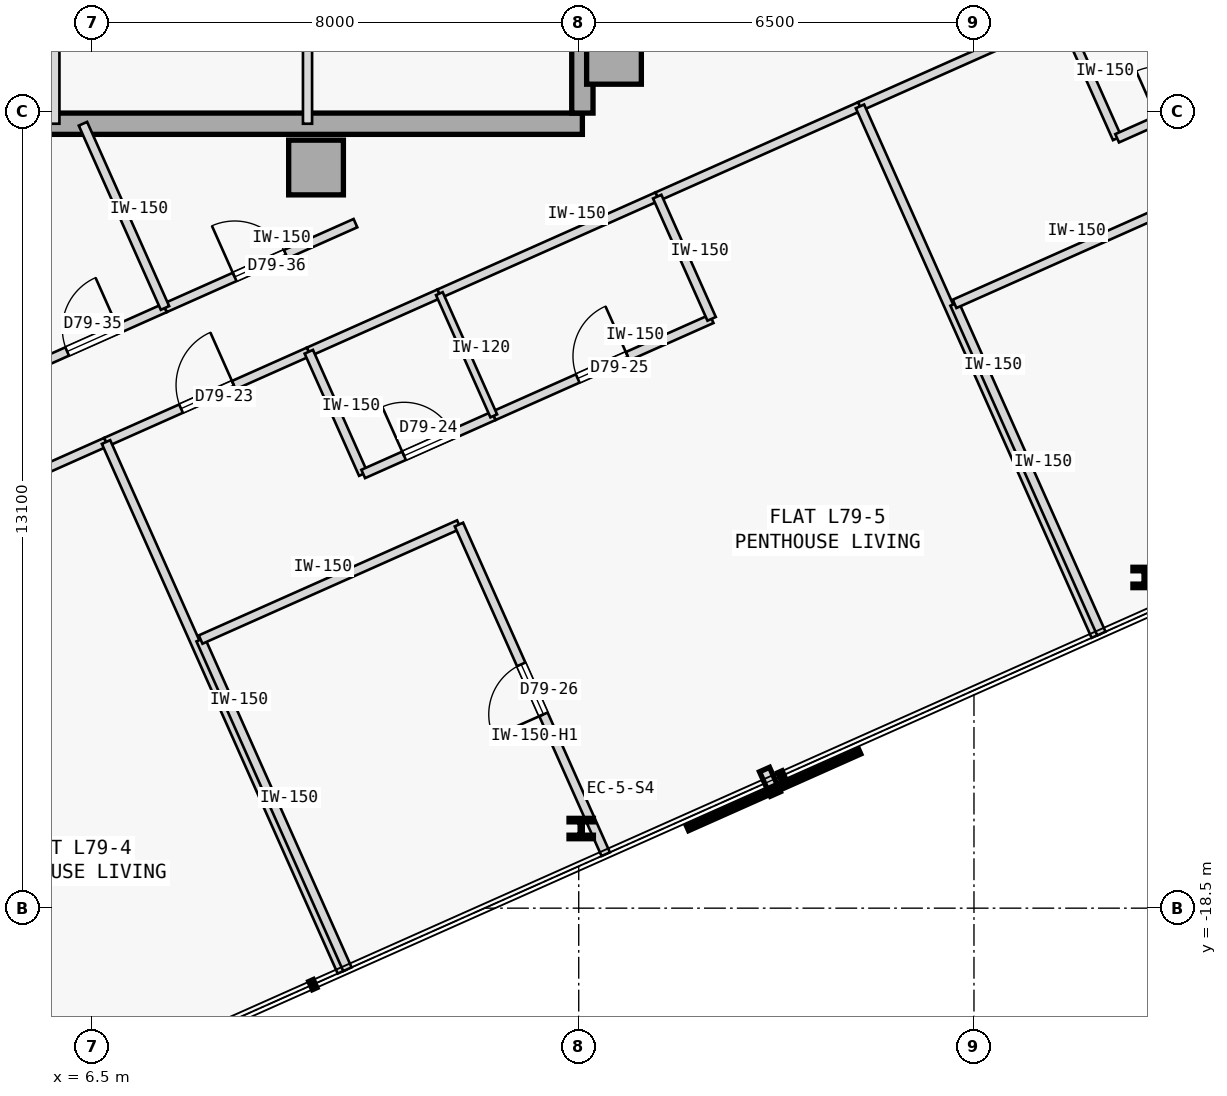
"""IFC4 building model, lengths in metres.
Left out: names, types, materials, properties, quantities, classifications, styles, units other than length and angle.
Written with IfcOpenShell. Run it as: python <this file> out.ifc"""

import sys

from ifc_helpers import new_model, si_unit, direction, frame, frame_2d, origin, origin_2d, place, context, subcontext, project, spatial, rectangle, i_section, extrude, element, fill, save


model = new_model("IFC4")
c1 = context("Model", 3, precision=1e-05, world=origin(), true_north=direction((0.0, 1.0)))
c2 = subcontext(c1, "Body", "Model", "MODEL_VIEW")
j1 = project(units=[si_unit("LENGTHUNIT", "METRE"), si_unit("PLANEANGLEUNIT", "RADIAN")], contexts=[c1])
p1 = place(None, origin())
s1 = spatial("IfcSite", under=j1, at=p1, CompositionType="ELEMENT")
p2 = place(p1, origin())
s2 = spatial("IfcBuilding", under=s1, at=p2, CompositionType="ELEMENT")
p3 = place(p2, frame((0.0, 0.0, 295.3)))
s3 = spatial("IfcBuildingStorey", under=s2, at=p3, CompositionType="ELEMENT", Elevation=295.3)
for number, where, z_axis, x_axis in (
    (1, (15.08, -4.5, 0.0), (0.0, 0.0, 1.0), (1.0, 0.0, 0.0)),
    (2, (10.18, -6.32, 0.0), (0.0, 0.0, 1.0), (1.0, 0.0, 0.0)),
):
    element("IfcColumn", number, at=place(p3, frame(where, z_axis=z_axis, x_axis=x_axis)), inside=s3, PredefinedType="COLUMN", context=c2, shape_type="SweptSolid", body=[
        extrude(rectangle(XDim=0.9, YDim=0.9, at=origin_2d()), origin(), (0.0, 0.0, 1.0), 3.35),
    ])
p4 = place(p3, frame((3.7, -5.6, 0.0), z_axis=(0.0, 0.0, 1.0), x_axis=(1.0, 0.0, 0.0)))
e3 = element("IfcWall", 3, at=p4, inside=s3, PredefinedType="SHEAR", context=c2, shape_type="SweptSolid", body=[
    extrude(rectangle(XDim=10.86, YDim=0.35, at=frame_2d((5.43, 0.0))), origin(), (0.0, 0.0, 1.0), 3.125),
])
p5 = place(p3, frame((14.56, -5.425, 0.0), z_axis=(0.0, 0.0, 1.0), x_axis=(0.0, 1.0, 0.0)))
e4 = element("IfcWall", 4, at=p5, inside=s3, PredefinedType="SHEAR", context=c2, shape_type="SweptSolid", body=[
    extrude(rectangle(XDim=10.85, YDim=0.35, at=frame_2d((5.425, 0.0))), origin(), (0.0, 0.0, 1.0), 3.125),
])
for number, where, z_axis, x_axis in (
    (5, (14.541, -17.19, 0.0), (0.0, 0.0, 1.0), (1.0, 0.0, 0.0)),
    (6, (23.814, -13.062, 0.0), (0.0, 0.0, 1.0), (1.0, 0.0, 0.0)),
):
    element("IfcColumn", number, at=place(p3, frame(where, z_axis=z_axis, x_axis=x_axis)), inside=s3, PredefinedType="COLUMN", context=c2, shape_type="SweptSolid", body=[
        extrude(i_section(OverallWidth=0.401, OverallDepth=0.335, WebThickness=0.036, FlangeThickness=0.058, FilletRadius=0.015, at=origin_2d()), origin(), (0.0, 0.0, 1.0), 3.35),
    ])
p6 = place(p3, frame((5.86, -5.6, 0.0), z_axis=(0.0, 0.0, 1.0), x_axis=(0.0, 1.0, 0.0)))
e7 = element("IfcWall", 7, at=p6, inside=s3, PredefinedType="STANDARD", context=c2, shape_type="SweptSolid", body=[
    extrude(rectangle(XDim=2.65, YDim=0.2, at=frame_2d((1.325, 0.0))), origin(), (0.0, 0.0, 1.0), 3.125),
])
p7 = place(p3, frame((10.04, -5.6, 0.0), z_axis=(0.0, 0.0, 1.0), x_axis=(0.0, 1.0, 0.0)))
e8 = element("IfcWall", 8, at=p7, inside=s3, PredefinedType="PARTITIONING", context=c2, shape_type="SweptSolid", body=[
    extrude(rectangle(XDim=2.65, YDim=0.15, at=frame_2d((1.325, 0.0))), origin(), (0.0, 0.0, 1.0), 3.125),
])
p8 = place(p3, frame((3.306, -12.357, 0.0), z_axis=(0.0, 0.0, 1.0), x_axis=(0.913550513402, 0.406725287464, 0.0)))
e9 = element("IfcWall", 9, at=p8, inside=s3, PredefinedType="PARTITIONING", context=c2, shape_type="SweptSolid", body=[
    extrude(rectangle(XDim=3.744, YDim=0.15, at=frame_2d((1.872, 0.0))), origin(), (0.0, 0.0, 1.0), 3.125),
])
p9 = place(p8, frame((1.397, 0.0, 0.0)))
e10 = element("IfcOpeningElement", 10, at=p9, cuts=e9, PredefinedType="OPENING", context=c2, shape_type="SweptSolid", body=[
    extrude(rectangle(XDim=0.95, YDim=2.15, at=frame_2d((0.475, 1.075))), frame((0.0, 0.085, 0.0), z_axis=(0.0, -1.0, 0.0), x_axis=(1.0, 0.0, 0.0)), (0.0, 0.0, 1.0), 0.17),
])
p10 = place(p3, frame((6.727, -10.834, 0.0), z_axis=(0.0, 0.0, 1.0), x_axis=(0.913543802, 0.40674036169, 0.0)))
e11 = element("IfcWall", 11, at=p10, inside=s3, PredefinedType="PARTITIONING", context=c2, shape_type="SweptSolid", body=[
    extrude(rectangle(XDim=3.65, YDim=0.15, at=frame_2d((1.825, 0.0))), origin(), (0.0, 0.0, 1.0), 3.125),
])
p11 = place(p10, frame((1.35, 0.0, 0.0)))
e12 = element("IfcOpeningElement", 12, at=p11, cuts=e11, PredefinedType="OPENING", context=c2, shape_type="SweptSolid", body=[
    extrude(rectangle(XDim=0.95, YDim=2.15, at=frame_2d((0.475, 1.075))), frame((0.0, 0.085, 0.0), z_axis=(0.0, -1.0, 0.0), x_axis=(1.0, 0.0, 0.0)), (0.0, 0.0, 1.0), 0.17),
])
p12 = place(p3, frame((15.791, -6.799, 0.0), z_axis=(0.0, 0.0, 1.0), x_axis=(0.913543802, 0.40674036169, 0.0)))
e13 = element("IfcWall", 13, at=p12, inside=s3, PredefinedType="PARTITIONING", context=c2, shape_type="SweptSolid", body=[
    extrude(rectangle(XDim=3.65, YDim=0.15, at=frame_2d((1.825, 0.0))), origin(), (0.0, 0.0, 1.0), 3.125),
])
p13 = place(p3, frame((10.061, -9.35, 0.0), z_axis=(0.0, 0.0, 1.0), x_axis=(0.913558622212, 0.406707073682, 0.0)))
e14 = element("IfcWall", 14, at=p13, inside=s3, PredefinedType="PARTITIONING", context=c2, shape_type="SweptSolid", body=[
    extrude(rectangle(XDim=2.35, YDim=0.15, at=frame_2d((1.175, 0.0))), origin(), (0.0, 0.0, 1.0), 3.125),
])
p14 = place(p3, frame((12.208, -8.394, 0.0), z_axis=(0.0, 0.0, 1.0), x_axis=(0.913539234326, 0.406750620585, 0.0)))
e15 = element("IfcWall", 15, at=p14, inside=s3, PredefinedType="PARTITIONING", context=c2, shape_type="SweptSolid", body=[
    extrude(rectangle(XDim=3.922, YDim=0.15, at=frame_2d((1.961, 0.0))), origin(), (0.0, 0.0, 1.0), 3.125),
])
p15 = place(p3, frame((19.125, -5.314, 0.0), z_axis=(0.0, 0.0, 1.0), x_axis=(0.913543802, 0.40674036169, 0.0)))
e16 = element("IfcWall", 16, at=p15, inside=s3, PredefinedType="PARTITIONING", context=c2, shape_type="SweptSolid", body=[
    extrude(rectangle(XDim=3.65, YDim=0.15, at=frame_2d((1.825, 0.0))), origin(), (0.0, 0.0, 1.0), 3.125),
])
p16 = place(p3, frame((5.32, -9.688, 0.0), z_axis=(0.0, 0.0, 1.0), x_axis=(0.913559784164, 0.406704463658, 0.0)))
e17 = element("IfcWall", 17, at=p16, inside=s3, PredefinedType="PARTITIONING", context=c2, shape_type="SweptSolid", body=[
    extrude(rectangle(XDim=2.601, YDim=0.15, at=frame_2d((1.301, 0.0))), origin(), (0.0, 0.0, 1.0), 3.125),
])
p17 = place(p16, frame((0.841, 0.0, 0.0)))
e18 = element("IfcOpeningElement", 18, at=p17, cuts=e17, PredefinedType="OPENING", context=c2, shape_type="SweptSolid", body=[
    extrude(rectangle(XDim=0.92, YDim=2.15, at=frame_2d((0.46, 1.075))), frame((0.0, 0.085, 0.0), z_axis=(0.0, -1.0, 0.0), x_axis=(1.0, 0.0, 0.0)), (0.0, 0.0, 1.0), 0.17),
])
p18 = place(p3, frame((7.696, -8.63, 0.0), z_axis=(0.0, 0.0, 1.0), x_axis=(0.913526514415, 0.406779187596, 0.0)))
e19 = element("IfcWall", 19, at=p18, inside=s3, PredefinedType="PARTITIONING", context=c2, shape_type="SweptSolid", body=[
    extrude(rectangle(XDim=3.429, YDim=0.15, at=frame_2d((1.714, 0.0))), origin(), (0.0, 0.0, 1.0), 3.125),
])
p19 = place(p18, frame((1.254, 0.0, 0.0)))
e20 = element("IfcOpeningElement", 20, at=p19, cuts=e19, PredefinedType="OPENING", context=c2, shape_type="SweptSolid", body=[
    extrude(rectangle(XDim=0.92, YDim=2.15, at=frame_2d((0.46, 1.075))), frame((0.0, 0.085, 0.0), z_axis=(0.0, -1.0, 0.0), x_axis=(1.0, 0.0, 0.0)), (0.0, 0.0, 1.0), 0.17),
])
p20 = place(p3, frame((10.605, -19.545, 0.0), z_axis=(0.0, 0.0, 1.0), x_axis=(-0.406760810574, 0.913534697196, 0.0)))
e21 = element("IfcWall", 21, at=p20, inside=s3, PredefinedType="PARTITIONING", context=c2, shape_type="SweptSolid", body=[
    extrude(rectangle(XDim=9.535, YDim=0.15, at=frame_2d((4.768, 0.0))), origin(), (0.0, 0.0, 1.0), 3.125),
])
p21 = place(p3, frame((10.956, -11.36, 0.0), z_axis=(0.0, 0.0, 1.0), x_axis=(-0.406725294076, 0.913550510459, 0.0)))
e22 = element("IfcWall", 22, at=p21, inside=s3, PredefinedType="PARTITIONING", context=c2, shape_type="SweptSolid", body=[
    extrude(rectangle(XDim=2.2, YDim=0.15, at=frame_2d((1.1, 0.0))), origin(), (0.0, 0.0, 1.0), 3.125),
])
p22 = place(p3, frame((10.956, -11.36, 0.0), z_axis=(0.0, 0.0, 1.0), x_axis=(0.913558622212, 0.406707073682, 0.0)))
e23 = element("IfcWall", 23, at=p22, inside=s3, PredefinedType="PARTITIONING", context=c2, shape_type="SweptSolid", body=[
    extrude(rectangle(XDim=2.35, YDim=0.15, at=frame_2d((1.175, 0.0))), origin(), (0.0, 0.0, 1.0), 3.125),
])
p23 = place(p22, frame((0.735, 0.0, 0.0)))
e24 = element("IfcOpeningElement", 24, at=p23, cuts=e23, PredefinedType="OPENING", context=c2, shape_type="SweptSolid", body=[
    extrude(rectangle(XDim=0.88, YDim=2.15, at=frame_2d((0.44, 1.075))), frame((0.0, 0.085, 0.0), z_axis=(0.0, -1.0, 0.0), x_axis=(1.0, 0.0, 0.0)), (0.0, 0.0, 1.0), 0.17),
])
p24 = place(p3, frame((13.103, -10.404, 0.0), z_axis=(0.0, 0.0, 1.0), x_axis=(0.913549532696, 0.406727490232, 0.0)))
e25 = element("IfcWall", 25, at=p24, inside=s3, PredefinedType="PARTITIONING", context=c2, shape_type="SweptSolid", body=[
    extrude(rectangle(XDim=3.922, YDim=0.15, at=frame_2d((1.961, 0.0))), origin(), (0.0, 0.0, 1.0), 3.125),
])
p25 = place(p24, frame((1.511, 0.0, 0.0)))
e26 = element("IfcOpeningElement", 26, at=p25, cuts=e25, PredefinedType="OPENING", context=c2, shape_type="SweptSolid", body=[
    extrude(rectangle(XDim=0.9, YDim=2.15, at=frame_2d((0.45, 1.075))), frame((0.0, 0.085, 0.0), z_axis=(0.0, -1.0, 0.0), x_axis=(1.0, 0.0, 0.0)), (0.0, 0.0, 1.0), 0.17),
])
p26 = place(p3, frame((16.686, -8.809, 0.0), z_axis=(0.0, 0.0, 1.0), x_axis=(-0.406817905151, 0.913509273105, 0.0)))
e27 = element("IfcWall", 27, at=p26, inside=s3, PredefinedType="PARTITIONING", context=c2, shape_type="SweptSolid", body=[
    extrude(rectangle(XDim=2.2, YDim=0.15, at=frame_2d((1.1, 0.0))), origin(), (0.0, 0.0, 1.0), 3.125),
])
p27 = place(p3, frame((10.696, -19.504, 0.0), z_axis=(0.0, 0.0, 1.0), x_axis=(-0.406749048544, 0.913539934271, 0.0)))
e28 = element("IfcWall", 28, at=p27, inside=s3, PredefinedType="PARTITIONING", context=c2, shape_type="SweptSolid", body=[
    extrude(rectangle(XDim=5.935, YDim=0.15, at=frame_2d((2.968, 0.0))), origin(), (0.0, 0.0, 1.0), 3.125),
])
p28 = place(p3, frame((8.282, -14.083, 0.0), z_axis=(0.0, 0.0, 1.0), x_axis=(0.91354505039, 0.40673755778, 0.0)))
e29 = element("IfcWall", 29, at=p28, inside=s3, PredefinedType="PARTITIONING", context=c2, shape_type="SweptSolid", body=[
    extrude(rectangle(XDim=4.65, YDim=0.15, at=frame_2d((2.325, 0.0))), origin(), (0.0, 0.0, 1.0), 3.125),
])
p29 = place(p3, frame((14.944, -17.613, 0.0), z_axis=(0.0, 0.0, 1.0), x_axis=(-0.406714717734, 0.913555219119, 0.0)))
e30 = element("IfcWall", 30, at=p29, inside=s3, PredefinedType="PARTITIONING", context=c2, shape_type="SweptSolid", body=[
    extrude(rectangle(XDim=5.935, YDim=0.15, at=frame_2d((2.967, 0.0))), origin(), (0.0, 0.0, 1.0), 2.675),
])
p30 = place(p29, frame((2.518, 0.0, 0.0)))
e31 = element("IfcOpeningElement", 31, at=p30, cuts=e30, PredefinedType="OPENING", context=c2, shape_type="SweptSolid", body=[
    extrude(rectangle(XDim=0.9, YDim=2.15, at=frame_2d((0.45, 1.075))), frame((0.0, 0.085, 0.0), z_axis=(0.0, -1.0, 0.0), x_axis=(1.0, 0.0, 0.0)), (0.0, 0.0, 1.0), 0.17),
])
p31 = place(p3, frame((23.003, -14.025, 0.0), z_axis=(0.0, 0.0, 1.0), x_axis=(-0.406729927653, 0.913548447512, 0.0)))
e32 = element("IfcWall", 32, at=p31, inside=s3, PredefinedType="PARTITIONING", context=c2, shape_type="SweptSolid", body=[
    extrude(rectangle(XDim=9.535, YDim=0.15, at=frame_2d((4.768, 0.0))), origin(), (0.0, 0.0, 1.0), 3.125),
])
p32 = place(p3, frame((13.103, -10.404, 0.0), z_axis=(0.0, 0.0, 1.0), x_axis=(-0.406725294076, 0.913550510459, 0.0)))
e33 = element("IfcWall", 33, at=p32, inside=s3, PredefinedType="PARTITIONING", context=c2, shape_type="SweptSolid", body=[
    extrude(rectangle(XDim=2.2, YDim=0.12, at=frame_2d((1.1, 0.0))), origin(), (0.0, 0.0, 1.0), 3.125),
])
p33 = place(p3, frame((23.354, -5.839, 0.0), z_axis=(0.0, 0.0, 1.0), x_axis=(-0.406725294076, 0.913550510459, 0.0)))
e34 = element("IfcWall", 34, at=p33, inside=s3, PredefinedType="PARTITIONING", context=c2, shape_type="SweptSolid", body=[
    extrude(rectangle(XDim=2.2, YDim=0.15, at=frame_2d((1.1, 0.0))), origin(), (0.0, 0.0, 1.0), 3.125),
])
p34 = place(p3, frame((23.354, -5.839, 0.0), z_axis=(0.0, 0.0, 1.0), x_axis=(0.913558622212, 0.406707073682, 0.0)))
e35 = element("IfcWall", 35, at=p34, inside=s3, PredefinedType="PARTITIONING", context=c2, shape_type="SweptSolid", body=[
    extrude(rectangle(XDim=2.35, YDim=0.15, at=frame_2d((1.175, 0.0))), origin(), (0.0, 0.0, 1.0), 3.125),
])
p35 = place(p34, frame((0.735, 0.0, 0.0)))
e36 = element("IfcOpeningElement", 36, at=p35, cuts=e35, PredefinedType="OPENING", context=c2, shape_type="SweptSolid", body=[
    extrude(rectangle(XDim=0.88, YDim=2.15, at=frame_2d((0.44, 1.075))), frame((0.0, 0.085, 0.0), z_axis=(0.0, -1.0, 0.0), x_axis=(1.0, 0.0, 0.0)), (0.0, 0.0, 1.0), 0.17),
])
p36 = place(p3, frame((23.095, -13.984, 0.0), z_axis=(0.0, 0.0, 1.0), x_axis=(-0.406749048544, 0.913539934271, 0.0)))
e37 = element("IfcWall", 37, at=p36, inside=s3, PredefinedType="PARTITIONING", context=c2, shape_type="SweptSolid", body=[
    extrude(rectangle(XDim=5.935, YDim=0.15, at=frame_2d((2.968, 0.0))), origin(), (0.0, 0.0, 1.0), 3.125),
])
p37 = place(p3, frame((20.681, -8.562, 0.0), z_axis=(0.0, 0.0, 1.0), x_axis=(0.91354505039, 0.40673755778, 0.0)))
e38 = element("IfcWall", 38, at=p37, inside=s3, PredefinedType="PARTITIONING", context=c2, shape_type="SweptSolid", body=[
    extrude(rectangle(XDim=4.65, YDim=0.15, at=frame_2d((2.325, 0.0))), origin(), (0.0, 0.0, 1.0), 3.125),
])
p38 = place(p3, frame((7.696, -8.63, 0.0), z_axis=(0.0, 0.0, 1.0), x_axis=(-0.406773661192, 0.913528975217, 0.0)))
e39 = element("IfcWall", 39, at=p38, inside=s3, PredefinedType="PARTITIONING", context=c2, shape_type="SweptSolid", body=[
    extrude(rectangle(XDim=3.316, YDim=0.15, at=frame_2d((1.658, 0.0))), origin(), (0.0, 0.0, 1.0), 3.125),
])
p39 = place(p11, origin())
e40 = element("IfcDoor", 40, at=p39, inside=s3, OperationType="SINGLE_SWING_RIGHT", PredefinedType="DOOR", context=c2, shape_type="SweptSolid", body=[
    extrude(rectangle(XDim=0.95, YDim=2.15, at=frame_2d((0.475, 1.075))), frame((0.0, 0.025, 0.0), z_axis=(0.0, -1.0, 0.0), x_axis=(1.0, 0.0, 0.0)), (0.0, 0.0, 1.0), 0.05),
])
fill(e12, e40)
p40 = place(p23, origin())
e41 = element("IfcDoor", 41, at=p40, inside=s3, OperationType="SINGLE_SWING_LEFT", PredefinedType="DOOR", context=c2, shape_type="SweptSolid", body=[
    extrude(rectangle(XDim=0.88, YDim=2.15, at=frame_2d((0.44, 1.075))), frame((0.0, 0.025, 0.0), z_axis=(0.0, -1.0, 0.0), x_axis=(1.0, 0.0, 0.0)), (0.0, 0.0, 1.0), 0.05),
])
fill(e24, e41)
p41 = place(p25, origin())
e42 = element("IfcDoor", 42, at=p41, inside=s3, OperationType="SINGLE_SWING_RIGHT", PredefinedType="DOOR", context=c2, shape_type="SweptSolid", body=[
    extrude(rectangle(XDim=0.9, YDim=2.15, at=frame_2d((0.45, 1.075))), frame((0.0, 0.025, 0.0), z_axis=(0.0, -1.0, 0.0), x_axis=(1.0, 0.0, 0.0)), (0.0, 0.0, 1.0), 0.05),
])
fill(e26, e42)
p42 = place(p30, origin())
e43 = element("IfcDoor", 43, at=p42, inside=s3, OperationType="SINGLE_SWING_LEFT", PredefinedType="DOOR", context=c2, shape_type="SweptSolid", body=[
    extrude(rectangle(XDim=0.9, YDim=2.15, at=frame_2d((0.45, 1.075))), frame((0.0, 0.025, 0.0), z_axis=(0.0, -1.0, 0.0), x_axis=(1.0, 0.0, 0.0)), (0.0, 0.0, 1.0), 0.05),
])
fill(e31, e43)
p43 = place(p17, origin())
e44 = element("IfcDoor", 44, at=p43, inside=s3, OperationType="SINGLE_SWING_RIGHT", PredefinedType="DOOR", context=c2, shape_type="SweptSolid", body=[
    extrude(rectangle(XDim=0.92, YDim=2.15, at=frame_2d((0.46, 1.075))), frame((0.0, 0.025, 0.0), z_axis=(0.0, -1.0, 0.0), x_axis=(1.0, 0.0, 0.0)), (0.0, 0.0, 1.0), 0.05),
])
fill(e18, e44)
p44 = place(p19, origin())
e45 = element("IfcDoor", 45, at=p44, inside=s3, OperationType="SINGLE_SWING_LEFT", PredefinedType="DOOR", context=c2, shape_type="SweptSolid", body=[
    extrude(rectangle(XDim=0.92, YDim=2.15, at=frame_2d((0.46, 1.075))), frame((0.0, 0.025, 0.0), z_axis=(0.0, -1.0, 0.0), x_axis=(1.0, 0.0, 0.0)), (0.0, 0.0, 1.0), 0.05),
])
fill(e20, e45)
save(model, sys.argv[1])
